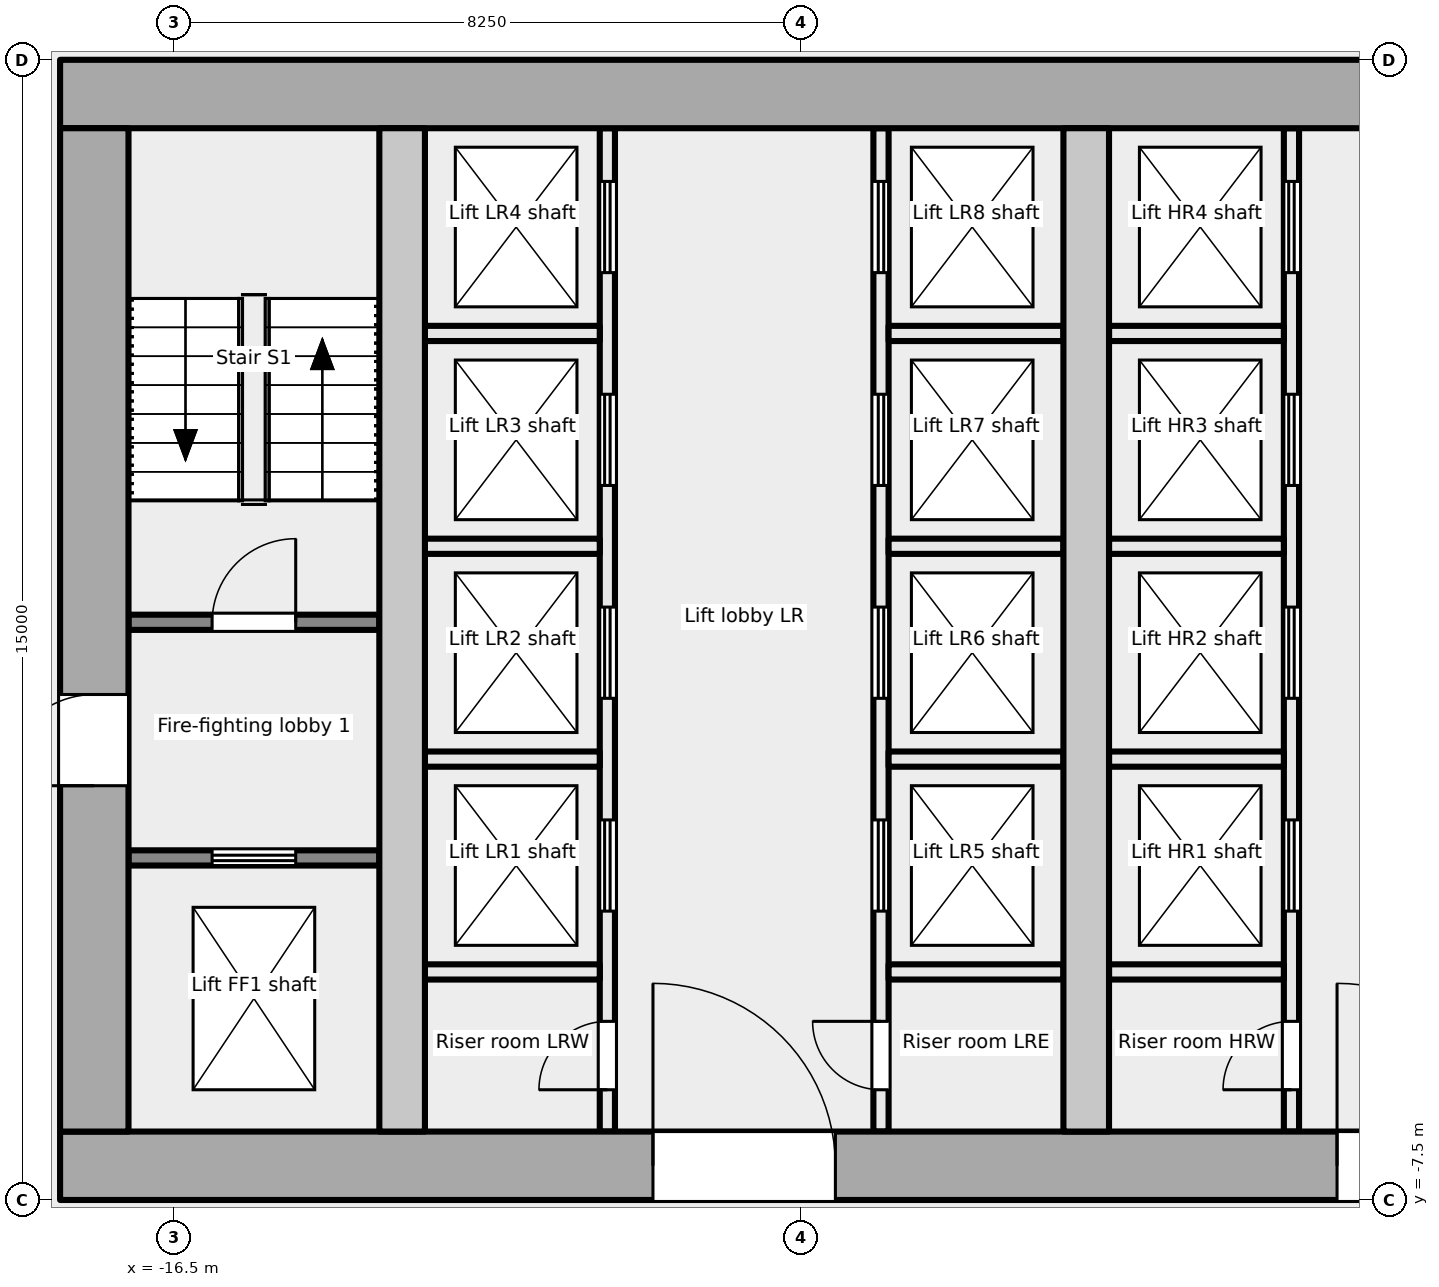
"""IFC4 building model, lengths in metres.
Left out: names, types, materials, properties, quantities, classifications, styles, units other than length and angle.
Written with IfcOpenShell. Run it as: python <this file> out.ifc"""

import sys

from ifc_helpers import new_model, si_unit, direction, frame, frame_2d, origin, place, context, subcontext, project, spatial, rectangle, extrude, element, fill, save


model = new_model("IFC4")
c1 = context("Model", 3, precision=1e-05, world=origin(), true_north=direction((0.0, 1.0)))
c2 = subcontext(c1, "Body", "Model", "MODEL_VIEW")
j1 = project(units=[si_unit("LENGTHUNIT", "METRE"), si_unit("PLANEANGLEUNIT", "RADIAN")], contexts=[c1])
p1 = place(None, origin())
s1 = spatial("IfcSite", under=j1, at=p1, CompositionType="ELEMENT")
p2 = place(p1, origin())
s2 = spatial("IfcBuilding", under=s1, at=p2, CompositionType="ELEMENT")
p3 = place(p2, frame((0.0, 0.0, 163.1)))
s3 = spatial("IfcBuildingStorey", under=s2, at=p3, CompositionType="ELEMENT", Elevation=163.1)
p4 = place(p3, frame((-18.0, -7.05, -0.2), z_axis=(0.0, 0.0, 1.0), x_axis=(1.0, 0.0, 0.0)))
e1 = element("IfcWall", 1, at=p4, inside=s3, PredefinedType="SHEAR", context=c2, shape_type="SweptSolid", body=[
    extrude(rectangle(XDim=36.0, YDim=0.9, at=frame_2d((18.0, 0.0))), origin(), (0.0, 0.0, 1.0), 5.4),
])
p5 = place(p4, frame((7.8, 0.0, 0.2)))
e2 = element("IfcOpeningElement", 2, at=p5, cuts=e1, PredefinedType="OPENING", context=c2, shape_type="SweptSolid", body=[
    extrude(rectangle(XDim=2.4, YDim=2.1, at=frame_2d((1.2, 1.05))), frame((0.0, 0.46, 0.0), z_axis=(0.0, -1.0, 0.0), x_axis=(1.0, 0.0, 0.0)), (0.0, 0.0, 1.0), 0.921),
])
p6 = place(p4, frame((16.8, 0.0, 0.2)))
e3 = element("IfcOpeningElement", 3, at=p6, cuts=e1, PredefinedType="OPENING", context=c2, shape_type="SweptSolid", body=[
    extrude(rectangle(XDim=2.4, YDim=2.1, at=frame_2d((1.2, 1.05))), frame((0.0, 0.46, 0.0), z_axis=(0.0, -1.0, 0.0), x_axis=(1.0, 0.0, 0.0)), (0.0, 0.0, 1.0), 0.921),
])
p7 = place(p4, frame((26.1, 0.0, 0.2)))
e4 = element("IfcOpeningElement", 4, at=p7, cuts=e1, PredefinedType="OPENING", context=c2, shape_type="SweptSolid", body=[
    extrude(rectangle(XDim=2.4, YDim=2.1, at=frame_2d((1.2, 1.05))), frame((0.0, 0.46, 0.0), z_axis=(0.0, -1.0, 0.0), x_axis=(1.0, 0.0, 0.0)), (0.0, 0.0, 1.0), 0.921),
])
p8 = place(p3, frame((-18.0, 7.05, -0.2), z_axis=(0.0, 0.0, 1.0), x_axis=(1.0, 0.0, 0.0)))
e5 = element("IfcWall", 5, at=p8, inside=s3, PredefinedType="SHEAR", context=c2, shape_type="SweptSolid", body=[
    extrude(rectangle(XDim=36.0, YDim=0.9, at=frame_2d((18.0, 0.0))), origin(), (0.0, 0.0, 1.0), 5.4),
])
p9 = place(p3, frame((-17.55, -6.6, -0.2), z_axis=(0.0, 0.0, 1.0), x_axis=(0.0, 1.0, 0.0)))
e6 = element("IfcWall", 6, at=p9, inside=s3, PredefinedType="SHEAR", context=c2, shape_type="SweptSolid", body=[
    extrude(rectangle(XDim=13.2, YDim=0.9, at=frame_2d((6.6, 0.0))), origin(), (0.0, 0.0, 1.0), 5.4),
])
p10 = place(p9, frame((4.55, 0.0, 0.2)))
e7 = element("IfcOpeningElement", 7, at=p10, cuts=e6, PredefinedType="OPENING", context=c2, shape_type="SweptSolid", body=[
    extrude(rectangle(XDim=1.2, YDim=2.1, at=frame_2d((0.6, 1.05))), frame((0.0, 0.46, 0.0), z_axis=(0.0, -1.0, 0.0), x_axis=(1.0, 0.0, 0.0)), (0.0, 0.0, 1.0), 0.921),
])
for number, where, z_axis, x_axis in (
    (8, (-13.5, -6.6, -0.2), (0.0, 0.0, 1.0), (0.0, 1.0, 0.0)),
    (9, (-4.5, -6.6, -0.2), (0.0, 0.0, 1.0), (0.0, 1.0, 0.0)),
):
    element("IfcWall", number, at=place(p3, frame(where, z_axis=z_axis, x_axis=x_axis)), inside=s3, PredefinedType="SHEAR", context=c2, shape_type="SweptSolid", body=[
        extrude(rectangle(XDim=13.2, YDim=0.6, at=frame_2d((6.6, 0.0))), origin(), (0.0, 0.0, 1.0), 5.4),
    ])
p11 = place(p3, frame((-17.1, -3.0, 0.0), z_axis=(0.0, 0.0, 1.0), x_axis=(1.0, 0.0, 0.0)))
e10 = element("IfcWall", 10, at=p11, inside=s3, PredefinedType="PARTITIONING", context=c2, shape_type="SweptSolid", body=[
    extrude(rectangle(XDim=3.3, YDim=0.2, at=frame_2d((1.65, 0.0))), origin(), (0.0, 0.0, 1.0), 5.2),
])
p12 = place(p11, frame((1.1, 0.0, 0.0)))
e11 = element("IfcOpeningElement", 11, at=p12, cuts=e10, PredefinedType="OPENING", context=c2, shape_type="SweptSolid", body=[
    extrude(rectangle(XDim=1.1, YDim=2.1, at=frame_2d((0.55, 1.05))), frame((0.0, 0.111, 0.0), z_axis=(0.0, -1.0, 0.0), x_axis=(1.0, 0.0, 0.0)), (0.0, 0.0, 1.0), 0.221),
])
p13 = place(p3, frame((-17.1, 0.1, 0.0), z_axis=(0.0, 0.0, 1.0), x_axis=(1.0, 0.0, 0.0)))
e12 = element("IfcWall", 12, at=p13, inside=s3, PredefinedType="PARTITIONING", context=c2, shape_type="SweptSolid", body=[
    extrude(rectangle(XDim=3.3, YDim=0.2, at=frame_2d((1.65, 0.0))), origin(), (0.0, 0.0, 1.0), 5.2),
])
p14 = place(p13, frame((1.1, 0.0, 0.0)))
e13 = element("IfcOpeningElement", 13, at=p14, cuts=e12, PredefinedType="OPENING", context=c2, shape_type="SweptSolid", body=[
    extrude(rectangle(XDim=1.1, YDim=2.1, at=frame_2d((0.55, 1.05))), frame((0.0, 0.111, 0.0), z_axis=(0.0, -1.0, 0.0), x_axis=(1.0, 0.0, 0.0)), (0.0, 0.0, 1.0), 0.221),
])
p15 = place(p3, frame((-10.8, -6.6, 0.0), z_axis=(0.0, 0.0, 1.0), x_axis=(0.0, 1.0, 0.0)))
e14 = element("IfcWall", 14, at=p15, inside=s3, PredefinedType="PARTITIONING", context=c2, shape_type="SweptSolid", body=[
    extrude(rectangle(XDim=13.2, YDim=0.2, at=frame_2d((6.6, 0.0))), origin(), (0.0, 0.0, 1.0), 5.2),
])
p16 = place(p15, frame((0.55, 0.0, 0.0)))
e15 = element("IfcOpeningElement", 15, at=p16, cuts=e14, PredefinedType="OPENING", context=c2, shape_type="SweptSolid", body=[
    extrude(rectangle(XDim=0.9, YDim=2.1, at=frame_2d((0.45, 1.05))), frame((0.0, 0.111, 0.0), z_axis=(0.0, -1.0, 0.0), x_axis=(1.0, 0.0, 0.0)), (0.0, 0.0, 1.0), 0.221),
])
p17 = place(p15, frame((2.9, 0.0, 0.0)))
e16 = element("IfcOpeningElement", 16, at=p17, cuts=e14, PredefinedType="OPENING", context=c2, shape_type="SweptSolid", body=[
    extrude(rectangle(XDim=1.2, YDim=2.1, at=frame_2d((0.6, 1.05))), frame((0.0, 0.111, 0.0), z_axis=(0.0, -1.0, 0.0), x_axis=(1.0, 0.0, 0.0)), (0.0, 0.0, 1.0), 0.221),
])
p18 = place(p15, frame((5.7, 0.0, 0.0)))
e17 = element("IfcOpeningElement", 17, at=p18, cuts=e14, PredefinedType="OPENING", context=c2, shape_type="SweptSolid", body=[
    extrude(rectangle(XDim=1.2, YDim=2.1, at=frame_2d((0.6, 1.05))), frame((0.0, 0.111, 0.0), z_axis=(0.0, -1.0, 0.0), x_axis=(1.0, 0.0, 0.0)), (0.0, 0.0, 1.0), 0.221),
])
p19 = place(p15, frame((8.5, 0.0, 0.0)))
e18 = element("IfcOpeningElement", 18, at=p19, cuts=e14, PredefinedType="OPENING", context=c2, shape_type="SweptSolid", body=[
    extrude(rectangle(XDim=1.2, YDim=2.1, at=frame_2d((0.6, 1.05))), frame((0.0, 0.111, 0.0), z_axis=(0.0, -1.0, 0.0), x_axis=(1.0, 0.0, 0.0)), (0.0, 0.0, 1.0), 0.221),
])
p20 = place(p15, frame((11.3, 0.0, 0.0)))
e19 = element("IfcOpeningElement", 19, at=p20, cuts=e14, PredefinedType="OPENING", context=c2, shape_type="SweptSolid", body=[
    extrude(rectangle(XDim=1.2, YDim=2.1, at=frame_2d((0.6, 1.05))), frame((0.0, 0.111, 0.0), z_axis=(0.0, -1.0, 0.0), x_axis=(1.0, 0.0, 0.0)), (0.0, 0.0, 1.0), 0.221),
])
p21 = place(p3, frame((-7.2, -6.6, 0.0), z_axis=(0.0, 0.0, 1.0), x_axis=(0.0, 1.0, 0.0)))
e20 = element("IfcWall", 20, at=p21, inside=s3, PredefinedType="PARTITIONING", context=c2, shape_type="SweptSolid", body=[
    extrude(rectangle(XDim=13.2, YDim=0.2, at=frame_2d((6.6, 0.0))), origin(), (0.0, 0.0, 1.0), 5.2),
])
p22 = place(p21, frame((0.55, 0.0, 0.0)))
e21 = element("IfcOpeningElement", 21, at=p22, cuts=e20, PredefinedType="OPENING", context=c2, shape_type="SweptSolid", body=[
    extrude(rectangle(XDim=0.9, YDim=2.1, at=frame_2d((0.45, 1.05))), frame((0.0, 0.111, 0.0), z_axis=(0.0, -1.0, 0.0), x_axis=(1.0, 0.0, 0.0)), (0.0, 0.0, 1.0), 0.221),
])
p23 = place(p21, frame((2.9, 0.0, 0.0)))
e22 = element("IfcOpeningElement", 22, at=p23, cuts=e20, PredefinedType="OPENING", context=c2, shape_type="SweptSolid", body=[
    extrude(rectangle(XDim=1.2, YDim=2.1, at=frame_2d((0.6, 1.05))), frame((0.0, 0.111, 0.0), z_axis=(0.0, -1.0, 0.0), x_axis=(1.0, 0.0, 0.0)), (0.0, 0.0, 1.0), 0.221),
])
p24 = place(p21, frame((5.7, 0.0, 0.0)))
e23 = element("IfcOpeningElement", 23, at=p24, cuts=e20, PredefinedType="OPENING", context=c2, shape_type="SweptSolid", body=[
    extrude(rectangle(XDim=1.2, YDim=2.1, at=frame_2d((0.6, 1.05))), frame((0.0, 0.111, 0.0), z_axis=(0.0, -1.0, 0.0), x_axis=(1.0, 0.0, 0.0)), (0.0, 0.0, 1.0), 0.221),
])
p25 = place(p21, frame((8.5, 0.0, 0.0)))
e24 = element("IfcOpeningElement", 24, at=p25, cuts=e20, PredefinedType="OPENING", context=c2, shape_type="SweptSolid", body=[
    extrude(rectangle(XDim=1.2, YDim=2.1, at=frame_2d((0.6, 1.05))), frame((0.0, 0.111, 0.0), z_axis=(0.0, -1.0, 0.0), x_axis=(1.0, 0.0, 0.0)), (0.0, 0.0, 1.0), 0.221),
])
p26 = place(p21, frame((11.3, 0.0, 0.0)))
e25 = element("IfcOpeningElement", 25, at=p26, cuts=e20, PredefinedType="OPENING", context=c2, shape_type="SweptSolid", body=[
    extrude(rectangle(XDim=1.2, YDim=2.1, at=frame_2d((0.6, 1.05))), frame((0.0, 0.111, 0.0), z_axis=(0.0, -1.0, 0.0), x_axis=(1.0, 0.0, 0.0)), (0.0, 0.0, 1.0), 0.221),
])
for number, where, z_axis, x_axis in (
    (26, (-13.2, -1.7, 0.0), (0.0, 0.0, 1.0), (1.0, 0.0, 0.0)),
    (27, (-13.2, 1.1, 0.0), (0.0, 0.0, 1.0), (1.0, 0.0, 0.0)),
    (28, (-13.2, 3.9, 0.0), (0.0, 0.0, 1.0), (1.0, 0.0, 0.0)),
    (29, (-13.2, -4.5, 0.0), (0.0, 0.0, 1.0), (1.0, 0.0, 0.0)),
    (30, (-7.1, -1.7, 0.0), (0.0, 0.0, 1.0), (1.0, 0.0, 0.0)),
    (31, (-7.1, 1.1, 0.0), (0.0, 0.0, 1.0), (1.0, 0.0, 0.0)),
    (32, (-7.1, 3.9, 0.0), (0.0, 0.0, 1.0), (1.0, 0.0, 0.0)),
    (33, (-7.1, -4.5, 0.0), (0.0, 0.0, 1.0), (1.0, 0.0, 0.0)),
):
    element("IfcWall", number, at=place(p3, frame(where, z_axis=z_axis, x_axis=x_axis)), inside=s3, PredefinedType="PARTITIONING", context=c2, shape_type="SweptSolid", body=[
        extrude(rectangle(XDim=2.3, YDim=0.2, at=frame_2d((1.15, 0.0))), origin(), (0.0, 0.0, 1.0), 5.2),
    ])
p27 = place(p3, frame((-1.8, -6.6, 0.0), z_axis=(0.0, 0.0, 1.0), x_axis=(0.0, 1.0, 0.0)))
e34 = element("IfcWall", 34, at=p27, inside=s3, PredefinedType="PARTITIONING", context=c2, shape_type="SweptSolid", body=[
    extrude(rectangle(XDim=13.2, YDim=0.2, at=frame_2d((6.6, 0.0))), origin(), (0.0, 0.0, 1.0), 5.2),
])
p28 = place(p27, frame((0.55, 0.0, 0.0)))
e35 = element("IfcOpeningElement", 35, at=p28, cuts=e34, PredefinedType="OPENING", context=c2, shape_type="SweptSolid", body=[
    extrude(rectangle(XDim=0.9, YDim=2.1, at=frame_2d((0.45, 1.05))), frame((0.0, 0.111, 0.0), z_axis=(0.0, -1.0, 0.0), x_axis=(1.0, 0.0, 0.0)), (0.0, 0.0, 1.0), 0.221),
])
p29 = place(p27, frame((2.9, 0.0, 0.0)))
e36 = element("IfcOpeningElement", 36, at=p29, cuts=e34, PredefinedType="OPENING", context=c2, shape_type="SweptSolid", body=[
    extrude(rectangle(XDim=1.2, YDim=2.1, at=frame_2d((0.6, 1.05))), frame((0.0, 0.111, 0.0), z_axis=(0.0, -1.0, 0.0), x_axis=(1.0, 0.0, 0.0)), (0.0, 0.0, 1.0), 0.221),
])
p30 = place(p27, frame((5.7, 0.0, 0.0)))
e37 = element("IfcOpeningElement", 37, at=p30, cuts=e34, PredefinedType="OPENING", context=c2, shape_type="SweptSolid", body=[
    extrude(rectangle(XDim=1.2, YDim=2.1, at=frame_2d((0.6, 1.05))), frame((0.0, 0.111, 0.0), z_axis=(0.0, -1.0, 0.0), x_axis=(1.0, 0.0, 0.0)), (0.0, 0.0, 1.0), 0.221),
])
p31 = place(p27, frame((8.5, 0.0, 0.0)))
e38 = element("IfcOpeningElement", 38, at=p31, cuts=e34, PredefinedType="OPENING", context=c2, shape_type="SweptSolid", body=[
    extrude(rectangle(XDim=1.2, YDim=2.1, at=frame_2d((0.6, 1.05))), frame((0.0, 0.111, 0.0), z_axis=(0.0, -1.0, 0.0), x_axis=(1.0, 0.0, 0.0)), (0.0, 0.0, 1.0), 0.221),
])
p32 = place(p27, frame((11.3, 0.0, 0.0)))
e39 = element("IfcOpeningElement", 39, at=p32, cuts=e34, PredefinedType="OPENING", context=c2, shape_type="SweptSolid", body=[
    extrude(rectangle(XDim=1.2, YDim=2.1, at=frame_2d((0.6, 1.05))), frame((0.0, 0.111, 0.0), z_axis=(0.0, -1.0, 0.0), x_axis=(1.0, 0.0, 0.0)), (0.0, 0.0, 1.0), 0.221),
])
for number, where, z_axis, x_axis in (
    (40, (-4.2, -1.7, 0.0), (0.0, 0.0, 1.0), (1.0, 0.0, 0.0)),
    (41, (-4.2, 1.1, 0.0), (0.0, 0.0, 1.0), (1.0, 0.0, 0.0)),
    (42, (-4.2, 3.9, 0.0), (0.0, 0.0, 1.0), (1.0, 0.0, 0.0)),
    (43, (-4.2, -4.5, 0.0), (0.0, 0.0, 1.0), (1.0, 0.0, 0.0)),
):
    element("IfcWall", number, at=place(p3, frame(where, z_axis=z_axis, x_axis=x_axis)), inside=s3, PredefinedType="PARTITIONING", context=c2, shape_type="SweptSolid", body=[
        extrude(rectangle(XDim=2.3, YDim=0.2, at=frame_2d((1.15, 0.0))), origin(), (0.0, 0.0, 1.0), 5.2),
    ])
p33 = place(p12, origin())
e44 = element("IfcDoor", 44, at=p33, inside=s3, OperationType="DOUBLE_DOOR_SLIDING", PredefinedType="DOOR", context=c2, shape_type="SweptSolid", body=[
    extrude(rectangle(XDim=1.1, YDim=2.1, at=frame_2d((0.55, 1.05))), frame((0.0, 0.025, 0.0), z_axis=(0.0, -1.0, 0.0), x_axis=(1.0, 0.0, 0.0)), (0.0, 0.0, 1.0), 0.05),
])
fill(e11, e44)
p34 = place(p10, origin())
e45 = element("IfcDoor", 45, at=p34, inside=s3, OperationType="SINGLE_SWING_LEFT", PredefinedType="DOOR", context=c2, shape_type="SweptSolid", body=[
    extrude(rectangle(XDim=1.2, YDim=2.1, at=frame_2d((0.6, 1.05))), frame((0.0, 0.025, 0.0), z_axis=(0.0, -1.0, 0.0), x_axis=(1.0, 0.0, 0.0)), (0.0, 0.0, 1.0), 0.05),
])
fill(e7, e45)
p35 = place(p14, origin())
e46 = element("IfcDoor", 46, at=p35, inside=s3, OperationType="SINGLE_SWING_RIGHT", PredefinedType="DOOR", context=c2, shape_type="SweptSolid", body=[
    extrude(rectangle(XDim=1.1, YDim=2.1, at=frame_2d((0.55, 1.05))), frame((0.0, 0.025, 0.0), z_axis=(0.0, -1.0, 0.0), x_axis=(1.0, 0.0, 0.0)), (0.0, 0.0, 1.0), 0.05),
])
fill(e13, e46)
p36 = place(p16, origin())
e47 = element("IfcDoor", 47, at=p36, inside=s3, OperationType="SINGLE_SWING_LEFT", PredefinedType="DOOR", context=c2, shape_type="SweptSolid", body=[
    extrude(rectangle(XDim=0.9, YDim=2.1, at=frame_2d((0.45, 1.05))), frame((0.0, 0.025, 0.0), z_axis=(0.0, -1.0, 0.0), x_axis=(1.0, 0.0, 0.0)), (0.0, 0.0, 1.0), 0.05),
])
fill(e15, e47)
p37 = place(p17, origin())
e48 = element("IfcDoor", 48, at=p37, inside=s3, OperationType="DOUBLE_DOOR_SLIDING", PredefinedType="DOOR", context=c2, shape_type="SweptSolid", body=[
    extrude(rectangle(XDim=1.2, YDim=2.1, at=frame_2d((0.6, 1.05))), frame((0.0, 0.025, 0.0), z_axis=(0.0, -1.0, 0.0), x_axis=(1.0, 0.0, 0.0)), (0.0, 0.0, 1.0), 0.05),
])
fill(e16, e48)
p38 = place(p18, origin())
e49 = element("IfcDoor", 49, at=p38, inside=s3, OperationType="DOUBLE_DOOR_SLIDING", PredefinedType="DOOR", context=c2, shape_type="SweptSolid", body=[
    extrude(rectangle(XDim=1.2, YDim=2.1, at=frame_2d((0.6, 1.05))), frame((0.0, 0.025, 0.0), z_axis=(0.0, -1.0, 0.0), x_axis=(1.0, 0.0, 0.0)), (0.0, 0.0, 1.0), 0.05),
])
fill(e17, e49)
p39 = place(p19, origin())
e50 = element("IfcDoor", 50, at=p39, inside=s3, OperationType="DOUBLE_DOOR_SLIDING", PredefinedType="DOOR", context=c2, shape_type="SweptSolid", body=[
    extrude(rectangle(XDim=1.2, YDim=2.1, at=frame_2d((0.6, 1.05))), frame((0.0, 0.025, 0.0), z_axis=(0.0, -1.0, 0.0), x_axis=(1.0, 0.0, 0.0)), (0.0, 0.0, 1.0), 0.05),
])
fill(e18, e50)
p40 = place(p20, origin())
e51 = element("IfcDoor", 51, at=p40, inside=s3, OperationType="DOUBLE_DOOR_SLIDING", PredefinedType="DOOR", context=c2, shape_type="SweptSolid", body=[
    extrude(rectangle(XDim=1.2, YDim=2.1, at=frame_2d((0.6, 1.05))), frame((0.0, 0.025, 0.0), z_axis=(0.0, -1.0, 0.0), x_axis=(1.0, 0.0, 0.0)), (0.0, 0.0, 1.0), 0.05),
])
fill(e19, e51)
p41 = place(p22, origin())
e52 = element("IfcDoor", 52, at=p41, inside=s3, OperationType="SINGLE_SWING_RIGHT", PredefinedType="DOOR", context=c2, shape_type="SweptSolid", body=[
    extrude(rectangle(XDim=0.9, YDim=2.1, at=frame_2d((0.45, 1.05))), frame((0.0, 0.025, 0.0), z_axis=(0.0, -1.0, 0.0), x_axis=(1.0, 0.0, 0.0)), (0.0, 0.0, 1.0), 0.05),
])
fill(e21, e52)
p42 = place(p23, origin())
e53 = element("IfcDoor", 53, at=p42, inside=s3, OperationType="DOUBLE_DOOR_SLIDING", PredefinedType="DOOR", context=c2, shape_type="SweptSolid", body=[
    extrude(rectangle(XDim=1.2, YDim=2.1, at=frame_2d((0.6, 1.05))), frame((0.0, 0.025, 0.0), z_axis=(0.0, -1.0, 0.0), x_axis=(1.0, 0.0, 0.0)), (0.0, 0.0, 1.0), 0.05),
])
fill(e22, e53)
p43 = place(p24, origin())
e54 = element("IfcDoor", 54, at=p43, inside=s3, OperationType="DOUBLE_DOOR_SLIDING", PredefinedType="DOOR", context=c2, shape_type="SweptSolid", body=[
    extrude(rectangle(XDim=1.2, YDim=2.1, at=frame_2d((0.6, 1.05))), frame((0.0, 0.025, 0.0), z_axis=(0.0, -1.0, 0.0), x_axis=(1.0, 0.0, 0.0)), (0.0, 0.0, 1.0), 0.05),
])
fill(e23, e54)
p44 = place(p25, origin())
e55 = element("IfcDoor", 55, at=p44, inside=s3, OperationType="DOUBLE_DOOR_SLIDING", PredefinedType="DOOR", context=c2, shape_type="SweptSolid", body=[
    extrude(rectangle(XDim=1.2, YDim=2.1, at=frame_2d((0.6, 1.05))), frame((0.0, 0.025, 0.0), z_axis=(0.0, -1.0, 0.0), x_axis=(1.0, 0.0, 0.0)), (0.0, 0.0, 1.0), 0.05),
])
fill(e24, e55)
p45 = place(p26, origin())
e56 = element("IfcDoor", 56, at=p45, inside=s3, OperationType="DOUBLE_DOOR_SLIDING", PredefinedType="DOOR", context=c2, shape_type="SweptSolid", body=[
    extrude(rectangle(XDim=1.2, YDim=2.1, at=frame_2d((0.6, 1.05))), frame((0.0, 0.025, 0.0), z_axis=(0.0, -1.0, 0.0), x_axis=(1.0, 0.0, 0.0)), (0.0, 0.0, 1.0), 0.05),
])
fill(e25, e56)
p46 = place(p5, origin())
e57 = element("IfcDoor", 57, at=p46, inside=s3, OperationType="DOUBLE_DOOR_DOUBLE_SWING", PredefinedType="DOOR", context=c2, shape_type="SweptSolid", body=[
    extrude(rectangle(XDim=2.4, YDim=2.1, at=frame_2d((1.2, 1.05))), frame((0.0, 0.025, 0.0), z_axis=(0.0, -1.0, 0.0), x_axis=(1.0, 0.0, 0.0)), (0.0, 0.0, 1.0), 0.05),
])
fill(e2, e57)
p47 = place(p28, origin())
e58 = element("IfcDoor", 58, at=p47, inside=s3, OperationType="SINGLE_SWING_LEFT", PredefinedType="DOOR", context=c2, shape_type="SweptSolid", body=[
    extrude(rectangle(XDim=0.9, YDim=2.1, at=frame_2d((0.45, 1.05))), frame((0.0, 0.025, 0.0), z_axis=(0.0, -1.0, 0.0), x_axis=(1.0, 0.0, 0.0)), (0.0, 0.0, 1.0), 0.05),
])
fill(e35, e58)
p48 = place(p29, origin())
e59 = element("IfcDoor", 59, at=p48, inside=s3, OperationType="DOUBLE_DOOR_SLIDING", PredefinedType="DOOR", context=c2, shape_type="SweptSolid", body=[
    extrude(rectangle(XDim=1.2, YDim=2.1, at=frame_2d((0.6, 1.05))), frame((0.0, 0.025, 0.0), z_axis=(0.0, -1.0, 0.0), x_axis=(1.0, 0.0, 0.0)), (0.0, 0.0, 1.0), 0.05),
])
fill(e36, e59)
p49 = place(p30, origin())
e60 = element("IfcDoor", 60, at=p49, inside=s3, OperationType="DOUBLE_DOOR_SLIDING", PredefinedType="DOOR", context=c2, shape_type="SweptSolid", body=[
    extrude(rectangle(XDim=1.2, YDim=2.1, at=frame_2d((0.6, 1.05))), frame((0.0, 0.025, 0.0), z_axis=(0.0, -1.0, 0.0), x_axis=(1.0, 0.0, 0.0)), (0.0, 0.0, 1.0), 0.05),
])
fill(e37, e60)
p50 = place(p31, origin())
e61 = element("IfcDoor", 61, at=p50, inside=s3, OperationType="DOUBLE_DOOR_SLIDING", PredefinedType="DOOR", context=c2, shape_type="SweptSolid", body=[
    extrude(rectangle(XDim=1.2, YDim=2.1, at=frame_2d((0.6, 1.05))), frame((0.0, 0.025, 0.0), z_axis=(0.0, -1.0, 0.0), x_axis=(1.0, 0.0, 0.0)), (0.0, 0.0, 1.0), 0.05),
])
fill(e38, e61)
p51 = place(p32, origin())
e62 = element("IfcDoor", 62, at=p51, inside=s3, OperationType="DOUBLE_DOOR_SLIDING", PredefinedType="DOOR", context=c2, shape_type="SweptSolid", body=[
    extrude(rectangle(XDim=1.2, YDim=2.1, at=frame_2d((0.6, 1.05))), frame((0.0, 0.025, 0.0), z_axis=(0.0, -1.0, 0.0), x_axis=(1.0, 0.0, 0.0)), (0.0, 0.0, 1.0), 0.05),
])
fill(e39, e62)
p52 = place(p6, origin())
e63 = element("IfcDoor", 63, at=p52, inside=s3, OperationType="DOUBLE_DOOR_DOUBLE_SWING", PredefinedType="DOOR", context=c2, shape_type="SweptSolid", body=[
    extrude(rectangle(XDim=2.4, YDim=2.1, at=frame_2d((1.2, 1.05))), frame((0.0, 0.025, 0.0), z_axis=(0.0, -1.0, 0.0), x_axis=(1.0, 0.0, 0.0)), (0.0, 0.0, 1.0), 0.05),
])
fill(e3, e63)
save(model, sys.argv[1])
